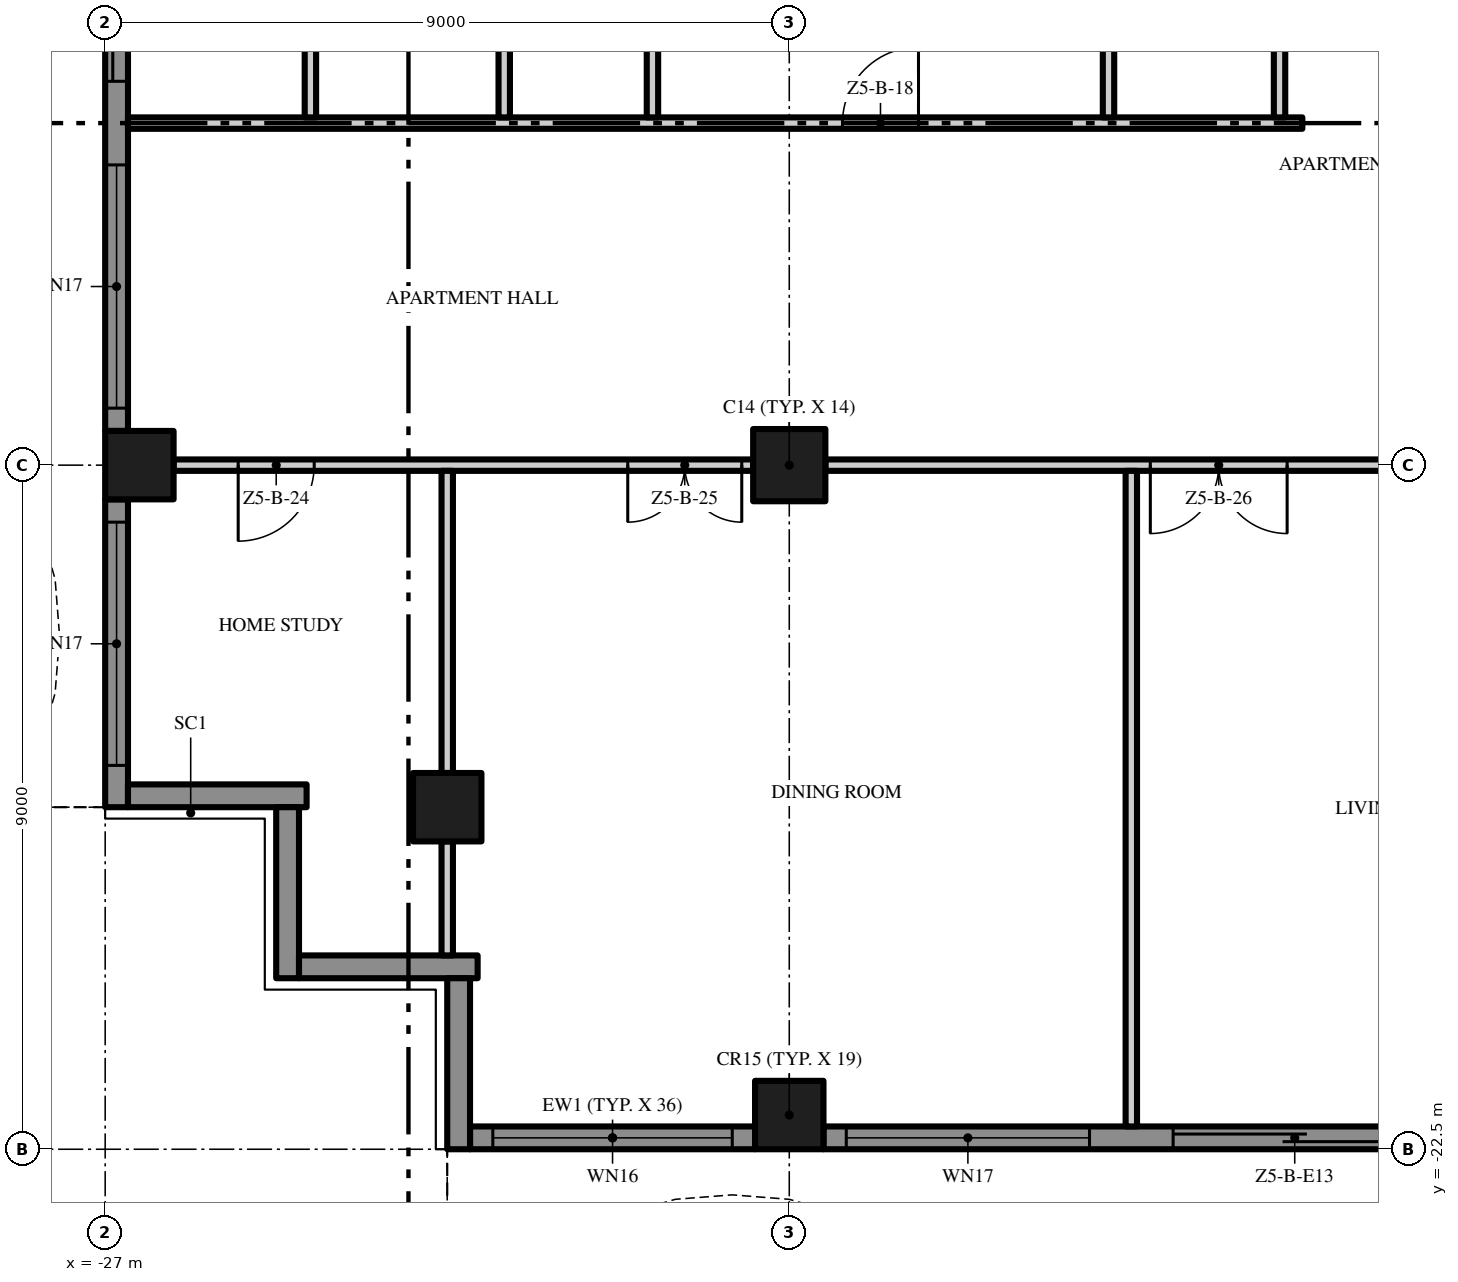
"""IFC4 building model, lengths in metres.
Left out: names, types, materials, properties, quantities, classifications, styles, units other than length and angle.
Written with IfcOpenShell. Run it as: python <this file> out.ifc"""

import sys

from ifc_helpers import new_model, si_unit, direction, frame, frame_2d, origin, origin_2d, place, context, subcontext, project, spatial, polyline, rectangle, outline, extrude, element, fill, save


model = new_model("IFC4")
c1 = context("Model", 3, precision=1e-05, world=origin(), true_north=direction((0.0, 1.0)))
c2 = subcontext(c1, "Body", "Model", "MODEL_VIEW")
j1 = project(units=[si_unit("LENGTHUNIT", "METRE"), si_unit("PLANEANGLEUNIT", "RADIAN")], contexts=[c1])
p1 = place(None, origin())
s1 = spatial("IfcSite", under=j1, at=p1, CompositionType="ELEMENT")
p2 = place(p1, origin())
s2 = spatial("IfcBuilding", under=s1, at=p2, CompositionType="ELEMENT")
p3 = place(p2, frame((0.0, 0.0, 257.8)))
s3 = spatial("IfcBuildingStorey", under=s2, at=p3, CompositionType="ELEMENT", Elevation=257.8)
p4 = place(p3, frame((-18.0, -13.5, 0.0), z_axis=(0.0, 0.0, 1.0), x_axis=(1.0, 0.0, 0.0)))
e1 = element("IfcColumn", 1, at=p4, inside=s3, PredefinedType="COLUMN", context=c2, shape_type="SweptSolid", body=[
    extrude(rectangle(XDim=0.95, YDim=0.95, at=origin_2d()), origin(), (0.0, 0.0, 1.0), 3.5),
])
for number, where, z_axis, x_axis in (
    (2, (-18.0, -22.05, 0.0), (0.0, 0.0, 1.0), (1.0, 0.0, 0.0)),
    (3, (-26.55, -13.5, 0.0), (0.0, 0.0, 1.0), (1.0, 0.0, 0.0)),
    (4, (-22.5, -18.0, 0.0), (0.0, 0.0, 1.0), (1.0, 0.0, 0.0)),
):
    element("IfcColumn", number, at=place(p3, frame(where, z_axis=z_axis, x_axis=x_axis)), inside=s3, PredefinedType="COLUMN", context=c2, shape_type="SweptSolid", body=[
        extrude(rectangle(XDim=0.9, YDim=0.9, at=origin_2d()), origin(), (0.0, 0.0, 1.0), 3.5),
    ])
p5 = place(p3, frame((-18.45, -22.35, 0.0), z_axis=(0.0, 0.0, 1.0), x_axis=(-1.0, 0.0, 0.0)))
e5 = element("IfcWall", 5, at=p5, inside=s3, PredefinedType="SOLIDWALL", context=c2, shape_type="SweptSolid", body=[
    extrude(rectangle(XDim=3.75, YDim=0.3, at=frame_2d((1.875, 0.0))), origin(), (0.0, 0.0, 1.0), 3.5),
])
p6 = place(p5, frame((0.3, 0.0, 0.45)))
e6 = element("IfcOpeningElement", 6, at=p6, cuts=e5, PredefinedType="OPENING", context=c2, shape_type="SweptSolid", body=[
    extrude(rectangle(XDim=3.15, YDim=2.65, at=frame_2d((1.575, 1.325))), frame((0.0, 0.16, 0.0), z_axis=(0.0, -1.0, 0.0), x_axis=(1.0, 0.0, 0.0)), (0.0, 0.0, 1.0), 0.32),
])
p7 = place(p3, frame((-9.45, -22.35, 0.0), z_axis=(0.0, 0.0, 1.0), x_axis=(-1.0, 0.0, 0.0)))
e7 = element("IfcWall", 7, at=p7, inside=s3, PredefinedType="SOLIDWALL", context=c2, shape_type="SweptSolid", body=[
    extrude(rectangle(XDim=8.1, YDim=0.3, at=frame_2d((4.05, 0.0))), origin(), (0.0, 0.0, 1.0), 3.5),
])
p8 = place(p7, frame((4.6, 0.0, 0.45)))
e8 = element("IfcOpeningElement", 8, at=p8, cuts=e7, PredefinedType="OPENING", context=c2, shape_type="SweptSolid", body=[
    extrude(rectangle(XDim=3.2, YDim=2.65, at=frame_2d((1.6, 1.325))), frame((0.0, 0.16, 0.0), z_axis=(0.0, -1.0, 0.0), x_axis=(1.0, 0.0, 0.0)), (0.0, 0.0, 1.0), 0.32),
])
p9 = place(p7, frame((0.3, 0.0, 0.0)))
e9 = element("IfcOpeningElement", 9, at=p9, cuts=e7, PredefinedType="OPENING", context=c2, shape_type="SweptSolid", body=[
    extrude(rectangle(XDim=3.2, YDim=2.4, at=frame_2d((1.6, 1.2))), frame((0.0, 0.16, 0.0), z_axis=(0.0, -1.0, 0.0), x_axis=(1.0, 0.0, 0.0)), (0.0, 0.0, 1.0), 0.32),
])
p10 = place(p3, frame((-26.85, -13.05, 0.0), z_axis=(0.0, 0.0, 1.0), x_axis=(0.0, 1.0, 0.0)))
e10 = element("IfcWall", 10, at=p10, inside=s3, PredefinedType="SOLIDWALL", context=c2, shape_type="SweptSolid", body=[
    extrude(rectangle(XDim=8.1, YDim=0.3, at=frame_2d((4.05, 0.0))), origin(), (0.0, 0.0, 1.0), 3.5),
])
p11 = place(p10, frame((4.6, 0.0, 0.0)))
e11 = element("IfcOpeningElement", 11, at=p11, cuts=e10, PredefinedType="OPENING", context=c2, shape_type="SweptSolid", body=[
    extrude(rectangle(XDim=3.2, YDim=2.4, at=frame_2d((1.6, 1.2))), frame((0.0, 0.16, 0.0), z_axis=(0.0, -1.0, 0.0), x_axis=(1.0, 0.0, 0.0)), (0.0, 0.0, 1.0), 0.32),
])
p12 = place(p10, frame((0.3, 0.0, 0.45)))
e12 = element("IfcOpeningElement", 12, at=p12, cuts=e10, PredefinedType="OPENING", context=c2, shape_type="SweptSolid", body=[
    extrude(rectangle(XDim=3.2, YDim=2.65, at=frame_2d((1.6, 1.325))), frame((0.0, 0.16, 0.0), z_axis=(0.0, -1.0, 0.0), x_axis=(1.0, 0.0, 0.0)), (0.0, 0.0, 1.0), 0.32),
])
p13 = place(p3, frame((-26.85, -18.0, 0.0), z_axis=(0.0, 0.0, 1.0), x_axis=(0.0, 1.0, 0.0)))
e13 = element("IfcWall", 13, at=p13, inside=s3, PredefinedType="SOLIDWALL", context=c2, shape_type="SweptSolid", body=[
    extrude(rectangle(XDim=4.05, YDim=0.3, at=frame_2d((2.025, 0.0))), origin(), (0.0, 0.0, 1.0), 3.5),
])
p14 = place(p13, frame((0.55, 0.0, 0.45)))
e14 = element("IfcOpeningElement", 14, at=p14, cuts=e13, PredefinedType="OPENING", context=c2, shape_type="SweptSolid", body=[
    extrude(rectangle(XDim=3.2, YDim=2.65, at=frame_2d((1.6, 1.325))), frame((0.0, 0.16, 0.0), z_axis=(0.0, -1.0, 0.0), x_axis=(1.0, 0.0, 0.0)), (0.0, 0.0, 1.0), 0.32),
])
p15 = place(p3, frame((-24.35, -17.85, 0.0), z_axis=(0.0, 0.0, 1.0), x_axis=(-1.0, 0.0, 0.0)))
e15 = element("IfcWall", 15, at=p15, inside=s3, PredefinedType="SOLIDWALL", context=c2, shape_type="SweptSolid", body=[
    extrude(rectangle(XDim=2.35, YDim=0.3, at=frame_2d((1.175, 0.0))), origin(), (0.0, 0.0, 1.0), 3.5),
])
p16 = place(p3, frame((-24.6, -20.25, 0.0), z_axis=(0.0, 0.0, 1.0), x_axis=(0.0, 1.0, 0.0)))
e16 = element("IfcWall", 16, at=p16, inside=s3, PredefinedType="SOLIDWALL", context=c2, shape_type="SweptSolid", body=[
    extrude(rectangle(XDim=2.25, YDim=0.3, at=frame_2d((1.125, 0.0))), origin(), (0.0, 0.0, 1.0), 3.5),
])
p17 = place(p3, frame((-22.1, -20.1, 0.0), z_axis=(0.0, 0.0, 1.0), x_axis=(-1.0, 0.0, 0.0)))
e17 = element("IfcWall", 17, at=p17, inside=s3, PredefinedType="SOLIDWALL", context=c2, shape_type="SweptSolid", body=[
    extrude(rectangle(XDim=2.35, YDim=0.3, at=frame_2d((1.175, 0.0))), origin(), (0.0, 0.0, 1.0), 3.5),
])
p18 = place(p3, frame((-22.35, -22.5, 0.0), z_axis=(0.0, 0.0, 1.0), x_axis=(0.0, 1.0, 0.0)))
e18 = element("IfcWall", 18, at=p18, inside=s3, PredefinedType="SOLIDWALL", context=c2, shape_type="SweptSolid", body=[
    extrude(rectangle(XDim=2.25, YDim=0.3, at=frame_2d((1.125, 0.0))), origin(), (0.0, 0.0, 1.0), 3.5),
])
p19 = place(p3, origin())
e19 = element("IfcWall", 19, at=p19, inside=s3, PredefinedType="USERDEFINED", context=c2, shape_type="SweptSolid", body=[
    extrude(outline(polyline([(-22.5, -24.3), (-21.0, -23.595), (-19.5, -23.159), (-18.75, -23.1), (-18.0, -23.159), (-16.5, -23.595), (-15.0, -24.3), (-13.5, -25.005), (-12.0, -25.441), (-11.25, -25.5), (-10.5, -25.441), (-9.0, -25.005), (-7.5, -24.3), (-6.0, -23.595), (-4.5, -23.159), (-3.75, -23.1), (-3.0, -23.159), (-1.5, -23.595), (0.0, -24.3), (1.5, -25.005), (3.0, -25.441), (3.75, -25.5), (4.5, -25.441), (6.0, -25.005), (7.5, -24.3), (9.0, -23.595), (10.5, -23.159), (11.25, -23.1), (12.0, -23.159), (13.5, -23.595), (15.0, -24.3), (16.5, -25.005), (18.0, -25.441), (18.75, -25.5), (19.5, -25.441), (21.0, -25.005), (22.5, -24.3), (22.394, -24.074), (20.911, -24.771), (19.455, -25.194), (18.75, -25.249), (18.045, -25.194), (16.589, -24.771), (15.106, -24.074), (13.589, -23.36), (12.045, -22.911), (11.25, -22.849), (10.455, -22.911), (8.911, -23.36), (7.394, -24.074), (5.911, -24.771), (4.455, -25.194), (3.75, -25.249), (3.045, -25.194), (1.589, -24.771), (0.106, -24.074), (-1.411, -23.36), (-2.955, -22.911), (-3.75, -22.849), (-4.545, -22.911), (-6.089, -23.36), (-7.606, -24.074), (-9.089, -24.771), (-10.545, -25.194), (-11.25, -25.249), (-11.955, -25.194), (-13.411, -24.771), (-14.894, -24.074), (-16.411, -23.36), (-17.955, -22.911), (-18.75, -22.849), (-19.545, -22.911), (-21.089, -23.36), (-22.606, -24.074), (-22.5, -24.3)])), origin(), (0.0, 0.0, 1.0), 0.9),
])
p20 = place(p3, origin())
e20 = element("IfcWall", 20, at=p20, inside=s3, PredefinedType="USERDEFINED", context=c2, shape_type="SweptSolid", body=[
    extrude(outline(polyline([(-28.8, 18.0), (-28.095, 16.5), (-27.659, 15.0), (-27.6, 14.25), (-27.659, 13.5), (-28.095, 12.0), (-28.8, 10.5), (-29.505, 9.0), (-29.941, 7.5), (-30.0, 6.75), (-29.941, 6.0), (-29.505, 4.5), (-28.8, 3.0), (-28.095, 1.5), (-27.659, 0.0), (-27.6, -0.75), (-27.659, -1.5), (-28.095, -3.0), (-28.8, -4.5), (-29.505, -6.0), (-29.941, -7.5), (-30.0, -8.25), (-29.941, -9.0), (-29.505, -10.5), (-28.8, -12.0), (-28.095, -13.5), (-27.659, -15.0), (-27.6, -15.75), (-27.659, -16.5), (-28.095, -18.0), (-27.855, -18.07), (-27.411, -16.545), (-27.349, -15.75), (-27.411, -14.955), (-27.86, -13.411), (-28.574, -11.894), (-29.271, -10.411), (-29.694, -8.955), (-29.749, -8.25), (-29.694, -7.545), (-29.271, -6.089), (-28.574, -4.606), (-27.86, -3.089), (-27.411, -1.545), (-27.349, -0.75), (-27.411, 0.045), (-27.86, 1.589), (-28.574, 3.106), (-29.271, 4.589), (-29.694, 6.045), (-29.749, 6.75), (-29.694, 7.455), (-29.271, 8.911), (-28.574, 10.394), (-27.86, 11.911), (-27.411, 13.455), (-27.349, 14.25), (-27.411, 15.045), (-27.86, 16.589), (-28.574, 18.106), (-28.8, 18.0)])), origin(), (0.0, 0.0, 1.0), 0.9),
])
p21 = place(p3, frame((-18.475, -13.5, 0.0), z_axis=(0.0, 0.0, 1.0), x_axis=(-1.0, 0.0, 0.0)))
e21 = element("IfcWall", 21, at=p21, inside=s3, PredefinedType="PARTITIONING", context=c2, shape_type="SweptSolid", body=[
    extrude(rectangle(XDim=7.625, YDim=0.15, at=frame_2d((3.812, 0.0))), origin(), (0.0, 0.0, 1.0), 3.5),
])
p22 = place(p21, frame((5.775, 0.0, 0.0)))
e22 = element("IfcOpeningElement", 22, at=p22, cuts=e21, PredefinedType="OPENING", context=c2, shape_type="SweptSolid", body=[
    extrude(rectangle(XDim=1.0, YDim=2.4, at=frame_2d((0.5, 1.2))), frame((0.0, 0.085, 0.0), z_axis=(0.0, -1.0, 0.0), x_axis=(1.0, 0.0, 0.0)), (0.0, 0.0, 1.0), 0.17),
])
p23 = place(p21, frame((0.15, 0.0, 0.0)))
e23 = element("IfcOpeningElement", 23, at=p23, cuts=e21, PredefinedType="OPENING", context=c2, shape_type="SweptSolid", body=[
    extrude(rectangle(XDim=1.5, YDim=2.4, at=frame_2d((0.75, 1.2))), frame((0.0, 0.085, 0.0), z_axis=(0.0, -1.0, 0.0), x_axis=(1.0, 0.0, 0.0)), (0.0, 0.0, 1.0), 0.17),
])
p24 = place(p3, frame((-9.475, -13.5, 0.0), z_axis=(0.0, 0.0, 1.0), x_axis=(-1.0, 0.0, 0.0)))
e24 = element("IfcWall", 24, at=p24, inside=s3, PredefinedType="PARTITIONING", context=c2, shape_type="SweptSolid", body=[
    extrude(rectangle(XDim=8.05, YDim=0.15, at=frame_2d((4.025, 0.0))), origin(), (0.0, 0.0, 1.0), 3.5),
])
p25 = place(p24, frame((1.975, 0.0, 0.0)))
e25 = element("IfcOpeningElement", 25, at=p25, cuts=e24, PredefinedType="OPENING", context=c2, shape_type="SweptSolid", body=[
    extrude(rectangle(XDim=1.8, YDim=2.4, at=frame_2d((0.9, 1.2))), frame((0.0, 0.085, 0.0), z_axis=(0.0, -1.0, 0.0), x_axis=(1.0, 0.0, 0.0)), (0.0, 0.0, 1.0), 0.17),
])
p26 = place(p3, frame((-26.7, -9.0, 0.0), z_axis=(0.0, 0.0, 1.0), x_axis=(1.0, 0.0, 0.0)))
e26 = element("IfcWall", 26, at=p26, inside=s3, PredefinedType="PARTITIONING", context=c2, shape_type="SweptSolid", body=[
    extrude(rectangle(XDim=15.45, YDim=0.15, at=frame_2d((7.725, 0.0))), origin(), (0.0, 0.0, 1.0), 3.5),
])
p27 = place(p26, frame((9.4, 0.0, 0.0)))
e27 = element("IfcOpeningElement", 27, at=p27, cuts=e26, PredefinedType="OPENING", context=c2, shape_type="SweptSolid", body=[
    extrude(rectangle(XDim=1.0, YDim=2.4, at=frame_2d((0.5, 1.2))), frame((0.0, 0.085, 0.0), z_axis=(0.0, -1.0, 0.0), x_axis=(1.0, 0.0, 0.0)), (0.0, 0.0, 1.0), 0.17),
])
p28 = place(p3, frame((-24.3, -8.925, 0.0), z_axis=(0.0, 0.0, 1.0), x_axis=(0.0, 1.0, 0.0)))
e28 = element("IfcWall", 28, at=p28, inside=s3, PredefinedType="PARTITIONING", context=c2, shape_type="SweptSolid", body=[
    extrude(rectangle(XDim=4.35, YDim=0.15, at=frame_2d((2.175, 0.0))), origin(), (0.0, 0.0, 1.0), 3.5),
])
p29 = place(p3, frame((-22.5, -19.95, 0.0), z_axis=(0.0, 0.0, 1.0), x_axis=(0.0, 1.0, 0.0)))
e29 = element("IfcWall", 29, at=p29, inside=s3, PredefinedType="PARTITIONING", context=c2, shape_type="SweptSolid", body=[
    extrude(rectangle(XDim=1.5, YDim=0.15, at=frame_2d((0.75, 0.0))), origin(), (0.0, 0.0, 1.0), 3.5),
])
p30 = place(p3, frame((-22.5, -17.55, 0.0), z_axis=(0.0, 0.0, 1.0), x_axis=(0.0, 1.0, 0.0)))
e30 = element("IfcWall", 30, at=p30, inside=s3, PredefinedType="PARTITIONING", context=c2, shape_type="SweptSolid", body=[
    extrude(rectangle(XDim=3.975, YDim=0.15, at=frame_2d((1.988, 0.0))), origin(), (0.0, 0.0, 1.0), 3.5),
])
for number, where, z_axis, x_axis in (
    (31, (-21.75, -8.925, 0.0), (0.0, 0.0, 1.0), (0.0, 1.0, 0.0)),
    (32, (-19.8, -8.925, 0.0), (0.0, 0.0, 1.0), (0.0, 1.0, 0.0)),
    (33, (-13.8, -8.925, 0.0), (0.0, 0.0, 1.0), (0.0, 1.0, 0.0)),
):
    element("IfcWall", number, at=place(p3, frame(where, z_axis=z_axis, x_axis=x_axis)), inside=s3, PredefinedType="PARTITIONING", context=c2, shape_type="SweptSolid", body=[
        extrude(rectangle(XDim=4.35, YDim=0.15, at=frame_2d((2.175, 0.0))), origin(), (0.0, 0.0, 1.0), 3.5),
    ])
p31 = place(p3, frame((-13.5, -22.2, 0.0), z_axis=(0.0, 0.0, 1.0), x_axis=(0.0, 1.0, 0.0)))
e34 = element("IfcWall", 34, at=p31, inside=s3, PredefinedType="PARTITIONING", context=c2, shape_type="SweptSolid", body=[
    extrude(rectangle(XDim=8.625, YDim=0.15, at=frame_2d((4.312, 0.0))), origin(), (0.0, 0.0, 1.0), 3.5),
])
p32 = place(p3, frame((-11.55, -8.925, 0.0), z_axis=(0.0, 0.0, 1.0), x_axis=(0.0, 1.0, 0.0)))
e35 = element("IfcWall", 35, at=p32, inside=s3, PredefinedType="PARTITIONING", context=c2, shape_type="SweptSolid", body=[
    extrude(rectangle(XDim=4.5, YDim=0.15, at=frame_2d((2.25, 0.0))), origin(), (0.0, 0.0, 1.0), 3.5),
])
p33 = place(p32, frame((1.75, 0.0, 0.0)))
e36 = element("IfcOpeningElement", 36, at=p33, cuts=e35, PredefinedType="OPENING", context=c2, shape_type="SweptSolid", body=[
    extrude(rectangle(XDim=0.9, YDim=2.1, at=frame_2d((0.45, 1.05))), frame((0.0, 0.085, 0.0), z_axis=(0.0, -1.0, 0.0), x_axis=(1.0, 0.0, 0.0)), (0.0, 0.0, 1.0), 0.17),
])
p34 = place(p6, origin())
e37 = element("IfcWindow", 37, at=p34, inside=s3, PartitioningType="SINGLE_PANEL", PredefinedType="WINDOW", context=c2, shape_type="SweptSolid", body=[
    extrude(rectangle(XDim=3.15, YDim=2.65, at=frame_2d((1.575, 1.325))), frame((0.0, 0.03, 0.0), z_axis=(0.0, -1.0, 0.0), x_axis=(1.0, 0.0, 0.0)), (0.0, 0.0, 1.0), 0.06),
])
fill(e6, e37)
p35 = place(p8, origin())
e38 = element("IfcWindow", 38, at=p35, inside=s3, PartitioningType="SINGLE_PANEL", PredefinedType="WINDOW", context=c2, shape_type="SweptSolid", body=[
    extrude(rectangle(XDim=3.2, YDim=2.65, at=frame_2d((1.6, 1.325))), frame((0.0, 0.03, 0.0), z_axis=(0.0, -1.0, 0.0), x_axis=(1.0, 0.0, 0.0)), (0.0, 0.0, 1.0), 0.06),
])
fill(e8, e38)
p36 = place(p9, origin())
e39 = element("IfcDoor", 39, at=p36, inside=s3, OperationType="SINGLE_SWING_LEFT", PredefinedType="DOOR", context=c2, shape_type="SweptSolid", body=[
    extrude(rectangle(XDim=3.2, YDim=2.4, at=frame_2d((1.6, 1.2))), frame((0.0, 0.025, 0.0), z_axis=(0.0, -1.0, 0.0), x_axis=(1.0, 0.0, 0.0)), (0.0, 0.0, 1.0), 0.05),
])
fill(e9, e39)
p37 = place(p11, origin())
e40 = element("IfcDoor", 40, at=p37, inside=s3, OperationType="SINGLE_SWING_LEFT", PredefinedType="DOOR", context=c2, shape_type="SweptSolid", body=[
    extrude(rectangle(XDim=3.2, YDim=2.4, at=frame_2d((1.6, 1.2))), frame((0.0, 0.025, 0.0), z_axis=(0.0, -1.0, 0.0), x_axis=(1.0, 0.0, 0.0)), (0.0, 0.0, 1.0), 0.05),
])
fill(e11, e40)
p38 = place(p12, origin())
e41 = element("IfcWindow", 41, at=p38, inside=s3, PartitioningType="SINGLE_PANEL", PredefinedType="WINDOW", context=c2, shape_type="SweptSolid", body=[
    extrude(rectangle(XDim=3.2, YDim=2.65, at=frame_2d((1.6, 1.325))), frame((0.0, 0.03, 0.0), z_axis=(0.0, -1.0, 0.0), x_axis=(1.0, 0.0, 0.0)), (0.0, 0.0, 1.0), 0.06),
])
fill(e12, e41)
p39 = place(p14, origin())
e42 = element("IfcWindow", 42, at=p39, inside=s3, PartitioningType="SINGLE_PANEL", PredefinedType="WINDOW", context=c2, shape_type="SweptSolid", body=[
    extrude(rectangle(XDim=3.2, YDim=2.65, at=frame_2d((1.6, 1.325))), frame((0.0, 0.03, 0.0), z_axis=(0.0, -1.0, 0.0), x_axis=(1.0, 0.0, 0.0)), (0.0, 0.0, 1.0), 0.06),
])
fill(e14, e42)
p40 = place(p27, origin())
e43 = element("IfcDoor", 43, at=p40, inside=s3, OperationType="SINGLE_SWING_RIGHT", PredefinedType="DOOR", context=c2, shape_type="SweptSolid", body=[
    extrude(rectangle(XDim=1.0, YDim=2.4, at=frame_2d((0.5, 1.2))), frame((0.0, 0.025, 0.0), z_axis=(0.0, -1.0, 0.0), x_axis=(1.0, 0.0, 0.0)), (0.0, 0.0, 1.0), 0.05),
])
fill(e27, e43)
p41 = place(p22, origin())
e44 = element("IfcDoor", 44, at=p41, inside=s3, OperationType="SINGLE_SWING_RIGHT", PredefinedType="DOOR", context=c2, shape_type="SweptSolid", body=[
    extrude(rectangle(XDim=1.0, YDim=2.4, at=frame_2d((0.5, 1.2))), frame((0.0, 0.025, 0.0), z_axis=(0.0, -1.0, 0.0), x_axis=(1.0, 0.0, 0.0)), (0.0, 0.0, 1.0), 0.05),
])
fill(e22, e44)
p42 = place(p23, origin())
e45 = element("IfcDoor", 45, at=p42, inside=s3, OperationType="DOUBLE_DOOR_SINGLE_SWING", PredefinedType="DOOR", context=c2, shape_type="SweptSolid", body=[
    extrude(rectangle(XDim=1.5, YDim=2.4, at=frame_2d((0.75, 1.2))), frame((0.0, 0.025, 0.0), z_axis=(0.0, -1.0, 0.0), x_axis=(1.0, 0.0, 0.0)), (0.0, 0.0, 1.0), 0.05),
])
fill(e23, e45)
p43 = place(p25, origin())
e46 = element("IfcDoor", 46, at=p43, inside=s3, OperationType="DOUBLE_DOOR_SINGLE_SWING", PredefinedType="DOOR", context=c2, shape_type="SweptSolid", body=[
    extrude(rectangle(XDim=1.8, YDim=2.4, at=frame_2d((0.9, 1.2))), frame((0.0, 0.025, 0.0), z_axis=(0.0, -1.0, 0.0), x_axis=(1.0, 0.0, 0.0)), (0.0, 0.0, 1.0), 0.05),
])
fill(e25, e46)
save(model, sys.argv[1])
